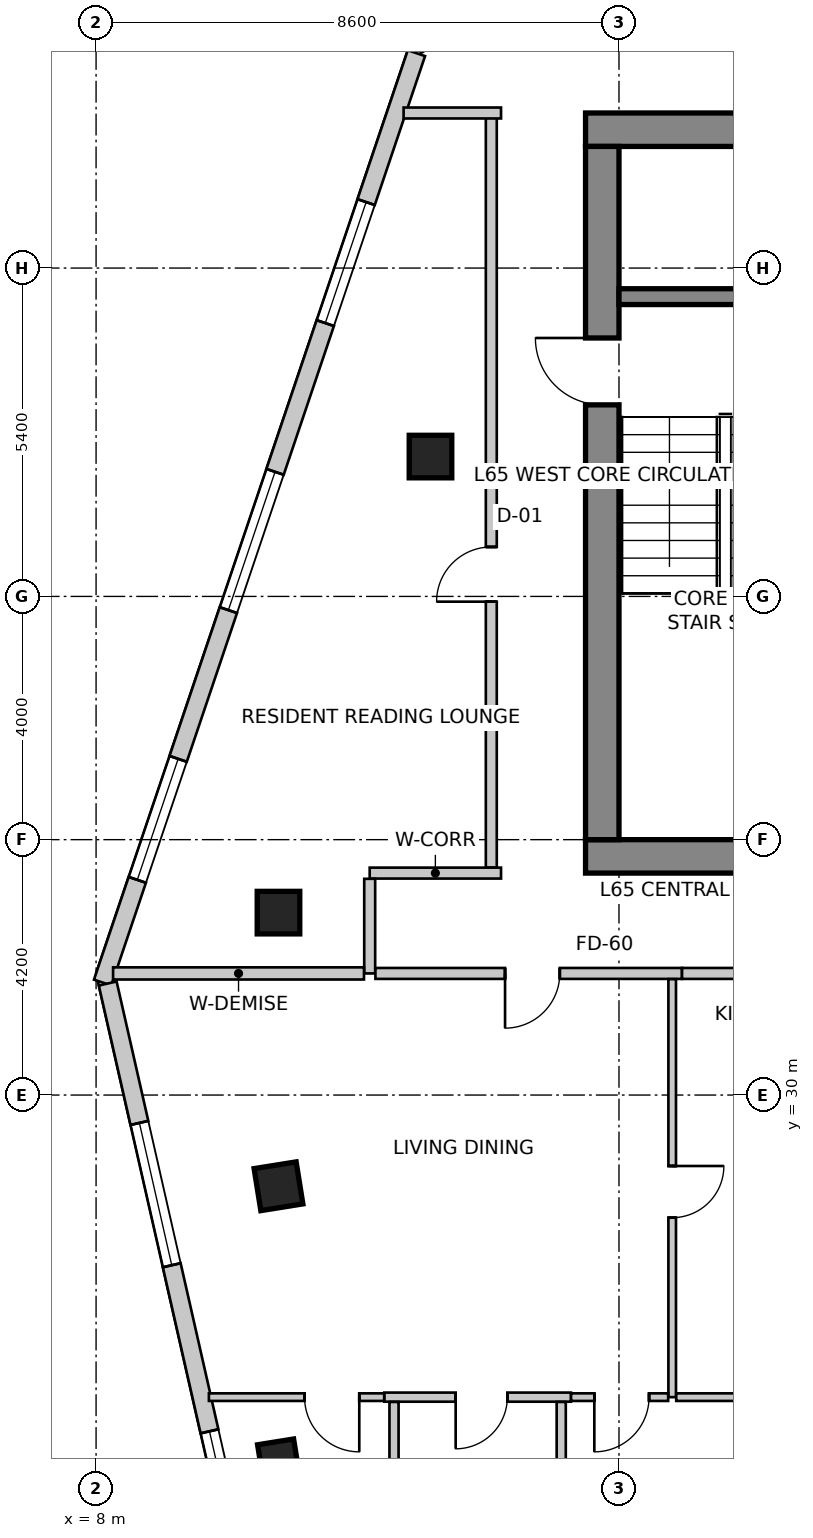
"""IFC4 building model, lengths in metres.
Left out: names, types, materials, properties, quantities, classifications, styles, units other than length and angle.
Written with IfcOpenShell. Run it as: python <this file> out.ifc"""

import sys

from ifc_helpers import new_model, si_unit, direction, frame, frame_2d, origin, origin_2d, place, context, subcontext, project, spatial, rectangle, extrude, source, transform, mapped, element, fill, save


model = new_model("IFC4")
c1 = context("Model", 3, precision=1e-05, world=origin(), true_north=direction((0.0, 1.0)))
c2 = subcontext(c1, "Body", "Model", "MODEL_VIEW")
j1 = project(units=[si_unit("LENGTHUNIT", "METRE"), si_unit("PLANEANGLEUNIT", "RADIAN")], contexts=[c1])
p1 = place(None, origin())
s1 = spatial("IfcSite", under=j1, at=p1, CompositionType="ELEMENT")
p2 = place(p1, origin())
s2 = spatial("IfcBuilding", under=s1, at=p2, CompositionType="ELEMENT")
p3 = place(p2, frame((0.0, 0.0, 256.5)))
s3 = spatial("IfcBuildingStorey", under=s2, at=p3, CompositionType="ELEMENT", Elevation=256.5)
p4 = place(p3, frame((16.05, 45.875, 0.0), z_axis=(0.0, 0.0, 1.0), x_axis=(1.0, 0.0, 0.0)))
e1 = element("IfcWall", 1, at=p4, inside=s3, PredefinedType="SHEAR", context=c2, shape_type="SweptSolid", body=[
    extrude(rectangle(XDim=15.5, YDim=0.55, at=frame_2d((7.75, 0.0))), origin(), (0.0, 0.0, 1.0), 3.6),
])
p5 = place(p3, frame((16.05, 33.925, 0.0), z_axis=(0.0, 0.0, 1.0), x_axis=(1.0, 0.0, 0.0)))
e2 = element("IfcWall", 2, at=p5, inside=s3, PredefinedType="SHEAR", context=c2, shape_type="SweptSolid", body=[
    extrude(rectangle(XDim=15.5, YDim=0.55, at=frame_2d((7.75, 0.0))), origin(), (0.0, 0.0, 1.0), 3.6),
])
m1 = source(origin(), c2, "Body", "SweptSolid", [
    extrude(rectangle(XDim=1.1, YDim=2.15, at=frame_2d((0.55, 1.075))), frame((0.0, 0.285, 0.0), z_axis=(0.0, -1.0, 0.0), x_axis=(1.0, 0.0, 0.0)), (0.0, 0.0, 1.0), 0.57),
])
p6 = place(p5, frame((9.98, 0.0, 0.0)))
e3 = element("IfcOpeningElement", 3, at=p6, cuts=e2, PredefinedType="OPENING", context=c2, shape_type="MappedRepresentation", body=[
    mapped(m1, transform((0.0, 0.0, 0.0), scale=1.0)),
])
p7 = place(p3, frame((16.325, 34.2, 0.0), z_axis=(0.0, 0.0, 1.0), x_axis=(0.0, 1.0, 0.0)))
e4 = element("IfcWall", 4, at=p7, inside=s3, PredefinedType="SHEAR", context=c2, shape_type="SweptSolid", body=[
    extrude(rectangle(XDim=11.4, YDim=0.55, at=frame_2d((5.7, 0.0))), origin(), (0.0, 0.0, 1.0), 3.6),
])
p8 = place(p7, frame((7.15, 0.0, 0.0)))
e5 = element("IfcOpeningElement", 5, at=p8, cuts=e4, PredefinedType="OPENING", context=c2, shape_type="MappedRepresentation", body=[
    mapped(m1, transform((0.0, 0.0, 0.0), scale=1.0)),
])
p9 = place(p3, frame((16.6, 43.13, 0.0), z_axis=(0.0, 0.0, 1.0), x_axis=(1.0, 0.0, 0.0)))
e6 = element("IfcWall", 6, at=p9, inside=s3, PredefinedType="SHEAR", context=c2, shape_type="SweptSolid", body=[
    extrude(rectangle(XDim=3.5, YDim=0.26, at=frame_2d((1.75, 0.0))), origin(), (0.0, 0.0, 1.0), 3.6),
])
m2 = source(origin(), c2, "Body", "SweptSolid", [
    extrude(rectangle(XDim=0.7, YDim=0.7, at=origin_2d()), origin(), (0.0, 0.0, 1.0), 3.6),
])
for number, where, z_axis, x_axis in (
    (7, (11.0, 33.0, 0.0), (0.0, 0.0, 1.0), (1.0, 0.0, 0.0)),
    (8, (13.5, 40.5, 0.0), (0.0, 0.0, 1.0), (1.0, 0.0, 0.0)),
    (9, (11.0, 28.5, 0.0), (0.0, 0.0, 1.0), (0.158, -0.987, 0.0)),
):
    element("IfcColumn", number, at=place(p3, frame(where, z_axis=z_axis, x_axis=x_axis)), inside=s3, PredefinedType="COLUMN", context=c2, shape_type="MappedRepresentation", body=[
        mapped(m2, transform((0.0, 0.0, 0.0), scale=1.0)),
    ])
m3 = source(origin(), c2, "Body", "SweptSolid", [
    extrude(rectangle(XDim=0.6, YDim=0.6, at=origin_2d()), origin(), (0.0, 0.0, 1.0), 3.6),
])
p10 = place(p3, frame((11.0, 24.0, 0.0), z_axis=(0.0, 0.0, 1.0), x_axis=(0.158158067254, -0.987413806751, 0.0)))
e10 = element("IfcColumn", 10, at=p10, inside=s3, PredefinedType="COLUMN", context=c2, shape_type="MappedRepresentation", body=[
    mapped(m3, transform((0.0, 0.0, 0.0), scale=1.0)),
])
p11 = place(p3, frame((21.874, 52.742, 0.0), z_axis=(0.0, 0.0, 1.0), x_axis=(-0.84365659959, -0.536883173482, 0.0)))
e11 = element("IfcWall", 11, at=p11, inside=s3, PredefinedType="SOLIDWALL", context=c2, shape_type="SweptSolid", body=[
    extrude(rectangle(XDim=10.283, YDim=0.3, at=frame_2d((5.142, 0.0))), origin(), (0.0, 0.0, 1.0), 3.35),
])
m4 = source(origin(), c2, "Body", "SweptSolid", [
    extrude(rectangle(XDim=2.4, YDim=2.2, at=frame_2d((1.2, 1.1))), frame((0.0, 0.16, 0.0), z_axis=(0.0, -1.0, 0.0), x_axis=(1.0, 0.0, 0.0)), (0.0, 0.0, 1.0), 0.32),
])
p12 = place(p11, frame((1.26, 0.0, 0.85)))
e12 = element("IfcOpeningElement", 12, at=p12, cuts=e11, PredefinedType="OPENING", context=c2, shape_type="MappedRepresentation", body=[
    mapped(m4, transform((0.0, 0.0, 0.0), scale=1.0)),
])
m5 = source(origin(), c2, "Body", "SweptSolid", [
    extrude(rectangle(XDim=2.1, YDim=2.0, at=frame_2d((1.05, 1.0))), frame((0.0, 0.16, 0.0), z_axis=(0.0, -1.0, 0.0), x_axis=(1.0, 0.0, 0.0)), (0.0, 0.0, 1.0), 0.32),
])
p13 = place(p11, frame((5.69, 0.0, 0.85)))
e13 = element("IfcOpeningElement", 13, at=p13, cuts=e11, PredefinedType="OPENING", context=c2, shape_type="MappedRepresentation", body=[
    mapped(m5, transform((0.0, 0.0, 0.0), scale=1.0)),
])
p14 = place(p3, frame((13.269, 47.134, 0.0), z_axis=(0.0, 0.0, 1.0), x_axis=(-0.3199211297, -0.947444178182, 0.0)))
e14 = element("IfcWall", 14, at=p14, inside=s3, PredefinedType="SOLIDWALL", context=c2, shape_type="SweptSolid", body=[
    extrude(rectangle(XDim=16.132, YDim=0.3, at=frame_2d((8.066, 0.0))), origin(), (0.0, 0.0, 1.0), 3.35),
])
p15 = place(p14, frame((2.585, 0.0, 0.85)))
e15 = element("IfcOpeningElement", 15, at=p15, cuts=e14, PredefinedType="OPENING", context=c2, shape_type="MappedRepresentation", body=[
    mapped(m5, transform((0.0, 0.0, 0.0), scale=1.0)),
])
p16 = place(p14, frame((7.267, 0.0, 0.85)))
e16 = element("IfcOpeningElement", 16, at=p16, cuts=e14, PredefinedType="OPENING", context=c2, shape_type="MappedRepresentation", body=[
    mapped(m4, transform((0.0, 0.0, 0.0), scale=1.0)),
])
p17 = place(p14, frame((12.249, 0.0, 0.85)))
e17 = element("IfcOpeningElement", 17, at=p17, cuts=e14, PredefinedType="OPENING", context=c2, shape_type="MappedRepresentation", body=[
    mapped(m5, transform((0.0, 0.0, 0.0), scale=1.0)),
])
p18 = place(p3, frame((8.191, 31.834, 0.0), z_axis=(0.0, 0.0, 1.0), x_axis=(0.221636032737, -0.975129462683, 0.0)))
e18 = element("IfcWall", 18, at=p18, inside=s3, PredefinedType="SOLIDWALL", context=c2, shape_type="SweptSolid", body=[
    extrude(rectangle(XDim=10.602, YDim=0.3, at=frame_2d((5.301, 0.0))), origin(), (0.0, 0.0, 1.0), 3.35),
])
p19 = place(p18, frame((2.351, 0.0, 0.85)))
e19 = element("IfcOpeningElement", 19, at=p19, cuts=e18, PredefinedType="OPENING", context=c2, shape_type="MappedRepresentation", body=[
    mapped(m4, transform((0.0, 0.0, 0.0), scale=1.0)),
])
p20 = place(p18, frame((7.552, 0.0, 0.85)))
e20 = element("IfcOpeningElement", 20, at=p20, cuts=e18, PredefinedType="OPENING", context=c2, shape_type="MappedRepresentation", body=[
    mapped(m4, transform((0.0, 0.0, 0.0), scale=1.0)),
])
p21 = place(p3, frame((12.5, 33.65, 0.0), z_axis=(0.0, 0.0, 1.0), x_axis=(1.0, 0.0, 0.0)))
e21 = element("IfcWall", 21, at=p21, inside=s3, PredefinedType="PARTITIONING", context=c2, shape_type="SweptSolid", body=[
    extrude(rectangle(XDim=2.16, YDim=0.18, at=frame_2d((1.08, 0.0))), origin(), (0.0, 0.0, 1.0), 3.35),
])
p22 = place(p3, frame((12.5, 32.0, 0.0), z_axis=(0.0, 0.0, 1.0), x_axis=(0.0, 1.0, 0.0)))
e22 = element("IfcWall", 22, at=p22, inside=s3, PredefinedType="PARTITIONING", context=c2, shape_type="SweptSolid", body=[
    extrude(rectangle(XDim=1.556, YDim=0.18, at=frame_2d((0.778, 0.0))), origin(), (0.0, 0.0, 1.0), 3.034),
])
p23 = place(p3, frame((17.635, 32.0, 0.0), z_axis=(0.0, 0.0, 1.0), x_axis=(-1.0, 0.0, 0.0)))
e23 = element("IfcWall", 23, at=p23, inside=s3, PredefinedType="PARTITIONING", context=c2, shape_type="SweptSolid", body=[
    extrude(rectangle(XDim=5.041, YDim=0.18, at=frame_2d((2.521, 0.0))), origin(), (0.0, 0.0, 1.0), 3.034),
])
m6 = source(origin(), c2, "Body", "SweptSolid", [
    extrude(rectangle(XDim=0.9, YDim=2.15, at=frame_2d((0.45, 1.075))), frame((0.0, 0.1, 0.0), z_axis=(0.0, -1.0, 0.0), x_axis=(1.0, 0.0, 0.0)), (0.0, 0.0, 1.0), 0.2),
])
p24 = place(p23, frame((2.009, 0.0, 0.0)))
e24 = element("IfcOpeningElement", 24, at=p24, cuts=e23, PredefinedType="OPENING", context=c2, shape_type="MappedRepresentation", body=[
    mapped(m6, transform((0.0, 0.0, 0.0), scale=1.0)),
])
p25 = place(p3, frame((19.896, 32.0, 0.0), z_axis=(0.0, 0.0, 1.0), x_axis=(-1.0, 0.0, 0.0)))
e25 = element("IfcWall", 25, at=p25, inside=s3, PredefinedType="PARTITIONING", context=c2, shape_type="SweptSolid", body=[
    extrude(rectangle(XDim=2.259, YDim=0.18, at=frame_2d((1.129, 0.0))), origin(), (0.0, 0.0, 1.0), 3.35),
])
p26 = place(p3, frame((14.5, 33.744, 0.0), z_axis=(0.0, 0.0, 1.0), x_axis=(0.0, 1.0, 0.0)))
e26 = element("IfcWall", 26, at=p26, inside=s3, PredefinedType="PARTITIONING", context=c2, shape_type="SweptSolid", body=[
    extrude(rectangle(XDim=12.406, YDim=0.18, at=frame_2d((6.203, 0.0))), origin(), (0.0, 0.0, 1.0), 3.35),
])
p27 = place(p26, frame((4.37, 0.0, 0.0)))
e27 = element("IfcOpeningElement", 27, at=p27, cuts=e26, PredefinedType="OPENING", context=c2, shape_type="MappedRepresentation", body=[
    mapped(m6, transform((0.0, 0.0, 0.0), scale=1.0)),
])
p28 = place(p3, frame((14.66, 46.15, 0.0), z_axis=(0.0, 0.0, 1.0), x_axis=(-1.0, 0.0, 0.0)))
e28 = element("IfcWall", 28, at=p28, inside=s3, PredefinedType="PARTITIONING", context=c2, shape_type="SweptSolid", body=[
    extrude(rectangle(XDim=1.602, YDim=0.18, at=frame_2d((0.801, 0.0))), origin(), (0.0, 0.0, 1.0), 3.35),
])
p29 = place(p3, frame((12.406, 32.0, 0.0), z_axis=(0.0, 0.0, 1.0), x_axis=(-1.0, 0.0, 0.0)))
e29 = element("IfcWall", 29, at=p29, inside=s3, PredefinedType="PARTITIONING", context=c2, shape_type="SweptSolid", body=[
    extrude(rectangle(XDim=4.126, YDim=0.2, at=frame_2d((2.063, 0.0))), origin(), (0.0, 0.0, 1.0), 2.642),
])
p30 = place(p3, frame((17.475, 31.906, 0.0), z_axis=(0.0, 0.0, 1.0), x_axis=(0.0, -1.0, 0.0)))
e30 = element("IfcWall", 30, at=p30, inside=s3, PredefinedType="PARTITIONING", context=c2, shape_type="SweptSolid", body=[
    extrude(rectangle(XDim=6.874, YDim=0.125, at=frame_2d((3.437, 0.0))), origin(), (0.0, 0.0, 1.0), 2.922),
])
m7 = source(origin(), c2, "Body", "SweptSolid", [
    extrude(rectangle(XDim=0.85, YDim=2.15, at=frame_2d((0.425, 1.075))), frame((0.0, 0.073, 0.0), z_axis=(0.0, -1.0, 0.0), x_axis=(1.0, 0.0, 0.0)), (0.0, 0.0, 1.0), 0.145),
])
p31 = place(p30, frame((3.073, 0.0, 0.0)))
e31 = element("IfcOpeningElement", 31, at=p31, cuts=e30, PredefinedType="OPENING", context=c2, shape_type="MappedRepresentation", body=[
    mapped(m7, transform((0.0, 0.0, 0.0), scale=1.0)),
])
p32 = place(p3, frame((15.81, 25.032, 0.0), z_axis=(0.0, 0.0, 1.0), x_axis=(-1.0, 0.0, 0.0)))
e32 = element("IfcWall", 32, at=p32, inside=s3, PredefinedType="PARTITIONING", context=c2, shape_type="SweptSolid", body=[
    extrude(rectangle(XDim=3.07, YDim=0.15, at=frame_2d((1.535, 0.0))), origin(), (0.0, 0.0, 1.0), 2.922),
])
m8 = source(origin(), c2, "Body", "SweptSolid", [
    extrude(rectangle(XDim=0.85, YDim=2.15, at=frame_2d((0.425, 1.075))), frame((0.0, 0.085, 0.0), z_axis=(0.0, -1.0, 0.0), x_axis=(1.0, 0.0, 0.0)), (0.0, 0.0, 1.0), 0.17),
])
p33 = place(p32, frame((1.046, 0.0, 0.0)))
e33 = element("IfcOpeningElement", 33, at=p33, cuts=e32, PredefinedType="OPENING", context=c2, shape_type="MappedRepresentation", body=[
    mapped(m8, transform((0.0, 0.0, 0.0), scale=1.0)),
])
p34 = place(p3, frame((12.738, 25.032, 0.0), z_axis=(0.0, 0.0, 1.0), x_axis=(-1.0, 0.0, 0.0)))
e34 = element("IfcWall", 34, at=p34, inside=s3, PredefinedType="PARTITIONING", context=c2, shape_type="SweptSolid", body=[
    extrude(rectangle(XDim=2.883, YDim=0.125, at=frame_2d((1.441, 0.0))), origin(), (0.0, 0.0, 1.0), 2.642),
])
m9 = source(origin(), c2, "Body", "SweptSolid", [
    extrude(rectangle(XDim=0.9, YDim=2.15, at=frame_2d((0.45, 1.075))), frame((0.0, 0.073, 0.0), z_axis=(0.0, -1.0, 0.0), x_axis=(1.0, 0.0, 0.0)), (0.0, 0.0, 1.0), 0.145),
])
p35 = place(p34, frame((0.409, 0.0, 0.0)))
e35 = element("IfcOpeningElement", 35, at=p35, cuts=e34, PredefinedType="OPENING", context=c2, shape_type="MappedRepresentation", body=[
    mapped(m9, transform((0.0, 0.0, 0.0), scale=1.0)),
])
p36 = place(p3, frame((17.408, 25.032, 0.0), z_axis=(0.0, 0.0, 1.0), x_axis=(-1.0, 0.0, 0.0)))
e36 = element("IfcWall", 36, at=p36, inside=s3, PredefinedType="PARTITIONING", context=c2, shape_type="SweptSolid", body=[
    extrude(rectangle(XDim=1.596, YDim=0.125, at=frame_2d((0.798, 0.0))), origin(), (0.0, 0.0, 1.0), 3.35),
])
p37 = place(p36, frame((0.314, 0.0, 0.0)))
e37 = element("IfcOpeningElement", 37, at=p37, cuts=e36, PredefinedType="OPENING", context=c2, shape_type="MappedRepresentation", body=[
    mapped(m9, transform((0.0, 0.0, 0.0), scale=1.0)),
])
p38 = place(p3, frame((19.594, 25.032, 0.0), z_axis=(0.0, 0.0, 1.0), x_axis=(-1.0, 0.0, 0.0)))
e38 = element("IfcWall", 38, at=p38, inside=s3, PredefinedType="PARTITIONING", context=c2, shape_type="SweptSolid", body=[
    extrude(rectangle(XDim=2.052, YDim=0.125, at=frame_2d((1.026, 0.0))), origin(), (0.0, 0.0, 1.0), 3.35),
])
p39 = place(p3, frame((12.9, 18.135, 0.0), z_axis=(0.0, 0.0, 1.0), x_axis=(0.0, 1.0, 0.0)))
e39 = element("IfcWall", 39, at=p39, inside=s3, PredefinedType="PARTITIONING", context=c2, shape_type="SweptSolid", body=[
    extrude(rectangle(XDim=6.818, YDim=0.15, at=frame_2d((3.409, 0.0))), origin(), (0.0, 0.0, 1.0), 2.922),
])
p40 = place(p3, frame((15.65, 24.953, 0.0), z_axis=(0.0, 0.0, 1.0), x_axis=(0.0, -1.0, 0.0)))
e40 = element("IfcWall", 40, at=p40, inside=s3, PredefinedType="PARTITIONING", context=c2, shape_type="SweptSolid", body=[
    extrude(rectangle(XDim=6.888, YDim=0.15, at=frame_2d((3.444, 0.0))), origin(), (0.0, 0.0, 1.0), 2.979),
])
m10 = source(origin(), c2, "Body", "SweptSolid", [
    extrude(rectangle(XDim=2.1, YDim=2.0, at=frame_2d((1.05, 1.0))), frame((0.0, -0.015, 0.0), z_axis=(0.0, -1.0, 0.0), x_axis=(1.0, 0.0, 0.0)), (0.0, 0.0, 1.0), 0.06),
])
p41 = place(p15, origin())
e41 = element("IfcWindow", 41, at=p41, inside=s3, PartitioningType="SINGLE_PANEL", PredefinedType="WINDOW", context=c2, shape_type="MappedRepresentation", body=[
    mapped(m10, transform((0.0, 0.0, 0.0), scale=1.0)),
])
fill(e15, e41)
m11 = source(origin(), c2, "Body", "SweptSolid", [
    extrude(rectangle(XDim=2.4, YDim=2.2, at=frame_2d((1.2, 1.1))), frame((0.0, -0.015, 0.0), z_axis=(0.0, -1.0, 0.0), x_axis=(1.0, 0.0, 0.0)), (0.0, 0.0, 1.0), 0.06),
])
p42 = place(p16, origin())
e42 = element("IfcWindow", 42, at=p42, inside=s3, PartitioningType="SINGLE_PANEL", PredefinedType="WINDOW", context=c2, shape_type="MappedRepresentation", body=[
    mapped(m11, transform((0.0, 0.0, 0.0), scale=1.0)),
])
fill(e16, e42)
p43 = place(p17, origin())
e43 = element("IfcWindow", 43, at=p43, inside=s3, PartitioningType="SINGLE_PANEL", PredefinedType="WINDOW", context=c2, shape_type="MappedRepresentation", body=[
    mapped(m10, transform((0.0, 0.0, 0.0), scale=1.0)),
])
fill(e17, e43)
p44 = place(p19, origin())
e44 = element("IfcWindow", 44, at=p44, inside=s3, PartitioningType="SINGLE_PANEL", PredefinedType="WINDOW", context=c2, shape_type="MappedRepresentation", body=[
    mapped(m11, transform((0.0, 0.0, 0.0), scale=1.0)),
])
fill(e19, e44)
p45 = place(p20, origin())
e45 = element("IfcWindow", 45, at=p45, inside=s3, PartitioningType="SINGLE_PANEL", PredefinedType="WINDOW", context=c2, shape_type="MappedRepresentation", body=[
    mapped(m11, transform((0.0, 0.0, 0.0), scale=1.0)),
])
fill(e20, e45)
m12 = source(origin(), c2, "Body", "SweptSolid", [
    extrude(rectangle(XDim=1.1, YDim=2.15, at=frame_2d((0.55, 1.075))), frame((0.0, 0.025, 0.0), z_axis=(0.0, -1.0, 0.0), x_axis=(1.0, 0.0, 0.0)), (0.0, 0.0, 1.0), 0.05),
])
p46 = place(p8, origin())
e46 = element("IfcDoor", 46, at=p46, inside=s3, OperationType="SINGLE_SWING_RIGHT", PredefinedType="DOOR", context=c2, shape_type="MappedRepresentation", body=[
    mapped(m12, transform((0.0, 0.0, 0.0), scale=1.0)),
])
fill(e5, e46)
m13 = source(origin(), c2, "Body", "SweptSolid", [
    extrude(rectangle(XDim=0.9, YDim=2.15, at=frame_2d((0.45, 1.075))), frame((0.0, 0.025, 0.0), z_axis=(0.0, -1.0, 0.0), x_axis=(1.0, 0.0, 0.0)), (0.0, 0.0, 1.0), 0.05),
])
p47 = place(p27, origin())
e47 = element("IfcDoor", 47, at=p47, inside=s3, OperationType="SINGLE_SWING_LEFT", PredefinedType="DOOR", context=c2, shape_type="MappedRepresentation", body=[
    mapped(m13, transform((0.0, 0.0, 0.0), scale=1.0)),
])
fill(e27, e47)
m14 = source(origin(), c2, "Body", "SweptSolid", [
    extrude(rectangle(XDim=0.9, YDim=2.15, at=frame_2d((0.45, 1.075))), frame((0.0, 0.025, 0.0), z_axis=(0.0, -1.0, 0.0), x_axis=(1.0, 0.0, 0.0)), (0.0, 0.0, 1.0), 0.05),
])
p48 = place(p24, origin())
e48 = element("IfcDoor", 48, at=p48, inside=s3, OperationType="SINGLE_SWING_RIGHT", PredefinedType="DOOR", context=c2, shape_type="MappedRepresentation", body=[
    mapped(m14, transform((0.0, 0.0, 0.0), scale=1.0)),
])
fill(e24, e48)
m15 = source(origin(), c2, "Body", "SweptSolid", [
    extrude(rectangle(XDim=0.85, YDim=2.15, at=frame_2d((0.425, 1.075))), frame((0.0, 0.025, 0.0), z_axis=(0.0, -1.0, 0.0), x_axis=(1.0, 0.0, 0.0)), (0.0, 0.0, 1.0), 0.05),
])
p49 = place(p31, origin())
e49 = element("IfcDoor", 49, at=p49, inside=s3, OperationType="SINGLE_SWING_LEFT", PredefinedType="DOOR", context=c2, shape_type="MappedRepresentation", body=[
    mapped(m15, transform((0.0, 0.0, 0.0), scale=1.0)),
])
fill(e31, e49)
p50 = place(p33, origin())
e50 = element("IfcDoor", 50, at=p50, inside=s3, OperationType="SINGLE_SWING_RIGHT", PredefinedType="DOOR", context=c2, shape_type="MappedRepresentation", body=[
    mapped(m15, transform((0.0, 0.0, 0.0), scale=1.0)),
])
fill(e33, e50)
p51 = place(p35, origin())
e51 = element("IfcDoor", 51, at=p51, inside=s3, OperationType="SINGLE_SWING_LEFT", PredefinedType="DOOR", context=c2, shape_type="MappedRepresentation", body=[
    mapped(m13, transform((0.0, 0.0, 0.0), scale=1.0)),
])
fill(e35, e51)
p52 = place(p37, origin())
e52 = element("IfcDoor", 52, at=p52, inside=s3, OperationType="SINGLE_SWING_RIGHT", PredefinedType="DOOR", context=c2, shape_type="MappedRepresentation", body=[
    mapped(m13, transform((0.0, 0.0, 0.0), scale=1.0)),
])
fill(e37, e52)
save(model, sys.argv[1])
